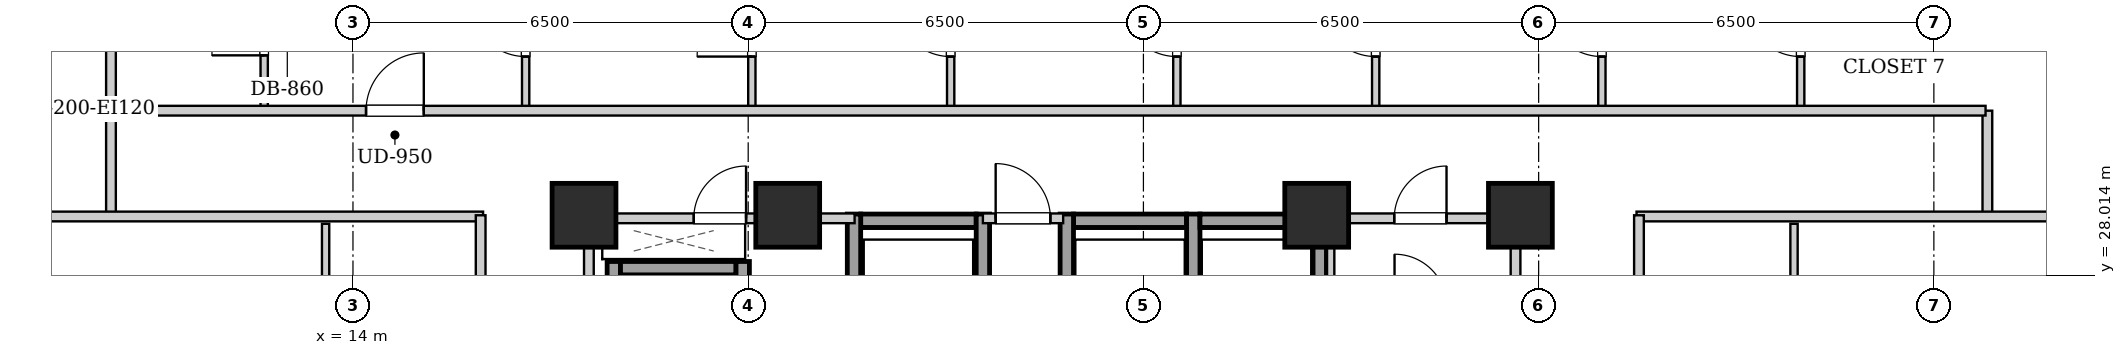
"""IFC4 building model, lengths in metres.
Left out: names, types, materials, properties, quantities, classifications, styles, units other than length and angle.
Written with IfcOpenShell. Run it as: python <this file> out.ifc"""

import sys

from ifc_helpers import new_model, si_unit, direction, frame, frame_2d, origin, origin_2d, place, context, subcontext, project, spatial, rectangle, extrude, element, fill, save


model = new_model("IFC4")
c1 = context("Model", 3, precision=1e-05, world=origin(), true_north=direction((0.0, 1.0)))
c2 = subcontext(c1, "Body", "Model", "MODEL_VIEW")
j1 = project(units=[si_unit("LENGTHUNIT", "METRE"), si_unit("PLANEANGLEUNIT", "RADIAN")], contexts=[c1])
p1 = place(None, origin())
s1 = spatial("IfcSite", under=j1, at=p1, CompositionType="ELEMENT")
p2 = place(p1, origin())
s2 = spatial("IfcBuilding", under=s1, at=p2, CompositionType="ELEMENT")
p3 = place(p2, frame((0.0, 0.0, 78.3)))
s3 = spatial("IfcBuildingStorey", under=s2, at=p3, CompositionType="ELEMENT", Elevation=78.3)
for number, where, z_axis, x_axis in (
    (1, (17.8, 29.0, 0.0), (0.0, 0.0, 1.0), (1.0, 0.0, 0.0)),
    (2, (21.15, 29.0, 0.0), (0.0, 0.0, 1.0), (1.0, 0.0, 0.0)),
    (3, (29.85, 29.0, 0.0), (0.0, 0.0, 1.0), (1.0, 0.0, 0.0)),
    (4, (33.2, 29.0, 0.0), (0.0, 0.0, 1.0), (1.0, 0.0, 0.0)),
):
    element("IfcColumn", number, at=place(p3, frame(where, z_axis=z_axis, x_axis=x_axis)), inside=s3, PredefinedType="COLUMN", context=c2, shape_type="SweptSolid", body=[
        extrude(rectangle(XDim=1.05, YDim=1.05, at=origin_2d()), origin(), (0.0, 0.0, 1.0), 3.2),
    ])
p4 = place(p3, frame((22.35, 28.91, 0.0), z_axis=(0.0, 0.0, 1.0), x_axis=(1.0, 0.0, 0.0)))
e5 = element("IfcWall", 5, at=p4, inside=s3, PredefinedType="SHEAR", context=c2, shape_type="SweptSolid", body=[
    extrude(rectangle(XDim=1.9, YDim=0.22, at=frame_2d((0.95, 0.0))), origin(), (0.0, 0.0, 1.0), 2.94),
])
for number, where, z_axis, x_axis in (
    (6, (22.24, 26.58, 0.0), (0.0, 0.0, 1.0), (0.0, 1.0, 0.0)),
    (7, (24.36, 26.58, 0.0), (0.0, 0.0, 1.0), (0.0, 1.0, 0.0)),
):
    element("IfcWall", number, at=place(p3, frame(where, z_axis=z_axis, x_axis=x_axis)), inside=s3, PredefinedType="SHEAR", context=c2, shape_type="SweptSolid", body=[
        extrude(rectangle(XDim=2.44, YDim=0.22, at=frame_2d((1.22, 0.0))), origin(), (0.0, 0.0, 1.0), 2.94),
    ])
p5 = place(p3, frame((25.85, 28.91, 0.0), z_axis=(0.0, 0.0, 1.0), x_axis=(1.0, 0.0, 0.0)))
e8 = element("IfcWall", 8, at=p5, inside=s3, PredefinedType="SHEAR", context=c2, shape_type="SweptSolid", body=[
    extrude(rectangle(XDim=1.86, YDim=0.22, at=frame_2d((0.93, 0.0))), origin(), (0.0, 0.0, 1.0), 2.94),
])
for number, where, z_axis, x_axis in (
    (9, (25.74, 26.58, 0.0), (0.0, 0.0, 1.0), (0.0, 1.0, 0.0)),
    (10, (27.82, 26.58, 0.0), (0.0, 0.0, 1.0), (0.0, 1.0, 0.0)),
):
    element("IfcWall", number, at=place(p3, frame(where, z_axis=z_axis, x_axis=x_axis)), inside=s3, PredefinedType="SHEAR", context=c2, shape_type="SweptSolid", body=[
        extrude(rectangle(XDim=2.44, YDim=0.22, at=frame_2d((1.22, 0.0))), origin(), (0.0, 0.0, 1.0), 2.94),
    ])
p6 = place(p3, frame((27.93, 28.91, 0.0), z_axis=(0.0, 0.0, 1.0), x_axis=(1.0, 0.0, 0.0)))
e11 = element("IfcWall", 11, at=p6, inside=s3, PredefinedType="SHEAR", context=c2, shape_type="SweptSolid", body=[
    extrude(rectangle(XDim=1.86, YDim=0.22, at=frame_2d((0.93, 0.0))), origin(), (0.0, 0.0, 1.0), 2.94),
])
p7 = place(p3, frame((29.9, 26.58, 0.0), z_axis=(0.0, 0.0, 1.0), x_axis=(0.0, 1.0, 0.0)))
e12 = element("IfcWall", 12, at=p7, inside=s3, PredefinedType="SHEAR", context=c2, shape_type="SweptSolid", body=[
    extrude(rectangle(XDim=2.44, YDim=0.22, at=frame_2d((1.22, 0.0))), origin(), (0.0, 0.0, 1.0), 2.94),
])
p8 = place(p3, frame((18.29, 24.1, 0.0), z_axis=(0.0, 0.0, 1.0), x_axis=(0.0, 1.0, 0.0)))
e13 = element("IfcWall", 13, at=p8, inside=s3, PredefinedType="SHEAR", context=c2, shape_type="SweptSolid", body=[
    extrude(rectangle(XDim=4.14, YDim=0.22, at=frame_2d((2.07, 0.0))), origin(), (0.0, 0.0, 1.0), 2.94),
])
p9 = place(p3, frame((18.4, 28.13, 0.0), z_axis=(0.0, 0.0, 1.0), x_axis=(1.0, 0.0, 0.0)))
e14 = element("IfcWall", 14, at=p9, inside=s3, PredefinedType="SHEAR", context=c2, shape_type="SweptSolid", body=[
    extrude(rectangle(XDim=1.9, YDim=0.22, at=frame_2d((0.95, 0.0))), origin(), (0.0, 0.0, 1.0), 2.94),
])
p10 = place(p3, frame((20.41, 26.06, 0.0), z_axis=(0.0, 0.0, 1.0), x_axis=(0.0, 1.0, 0.0)))
e15 = element("IfcWall", 15, at=p10, inside=s3, PredefinedType="SHEAR", context=c2, shape_type="SweptSolid", body=[
    extrude(rectangle(XDim=2.18, YDim=0.22, at=frame_2d((1.09, 0.0))), origin(), (0.0, 0.0, 1.0), 2.94),
])
for number, where, z_axis, x_axis in (
    (16, (17.88, 24.12, 0.0), (0.0, 0.0, 1.0), (0.0, 1.0, 0.0)),
    (17, (33.12, 24.12, 0.0), (0.0, 0.0, 1.0), (0.0, 1.0, 0.0)),
):
    element("IfcWall", number, at=place(p3, frame(where, z_axis=z_axis, x_axis=x_axis)), inside=s3, PredefinedType="PARTITIONING", context=c2, shape_type="SweptSolid", body=[
        extrude(rectangle(XDim=4.76, YDim=0.16, at=frame_2d((2.38, 0.0))), origin(), (0.0, 0.0, 1.0), 2.275),
    ])
p11 = place(p3, frame((24.36, 28.95, 0.0), z_axis=(0.0, 0.0, 1.0), x_axis=(1.0, 0.0, 0.0)))
e18 = element("IfcWall", 18, at=p11, inside=s3, PredefinedType="PARTITIONING", context=c2, shape_type="SweptSolid", body=[
    extrude(rectangle(XDim=1.32, YDim=0.16, at=frame_2d((0.66, 0.0))), origin(), (0.0, 0.0, 1.0), 2.309),
])
p12 = place(p11, frame((0.21, 0.0, 0.0)))
e19 = element("IfcOpeningElement", 19, at=p12, cuts=e18, PredefinedType="OPENING", context=c2, shape_type="SweptSolid", body=[
    extrude(rectangle(XDim=0.9, YDim=2.05, at=frame_2d((0.45, 1.025))), frame((0.0, 0.09, 0.0), z_axis=(0.0, -1.0, 0.0), x_axis=(1.0, 0.0, 0.0)), (0.0, 0.0, 1.0), 0.18),
])
p13 = place(p3, frame((17.96, 28.95, 0.0), z_axis=(0.0, 0.0, 1.0), x_axis=(1.0, 0.0, 0.0)))
e20 = element("IfcWall", 20, at=p13, inside=s3, PredefinedType="PARTITIONING", context=c2, shape_type="SweptSolid", body=[
    extrude(rectangle(XDim=4.29, YDim=0.16, at=frame_2d((2.145, 0.0))), origin(), (0.0, 0.0, 1.0), 2.309),
])
p14 = place(p13, frame((1.645, 0.0, 0.0)))
e21 = element("IfcOpeningElement", 21, at=p14, cuts=e20, PredefinedType="OPENING", context=c2, shape_type="SweptSolid", body=[
    extrude(rectangle(XDim=0.86, YDim=2.05, at=frame_2d((0.43, 1.025))), frame((0.0, 0.09, 0.0), z_axis=(0.0, -1.0, 0.0), x_axis=(1.0, 0.0, 0.0)), (0.0, 0.0, 1.0), 0.18),
])
p15 = place(p3, frame((30.08, 26.18, 0.0), z_axis=(0.0, 0.0, 1.0), x_axis=(0.0, 1.0, 0.0)))
e22 = element("IfcWall", 22, at=p15, inside=s3, PredefinedType="PARTITIONING", context=c2, shape_type="SweptSolid", body=[
    extrude(rectangle(XDim=2.68, YDim=0.12, at=frame_2d((1.34, 0.0))), origin(), (0.0, 0.0, 1.0), 2.94),
])
p16 = place(p3, frame((30.08, 28.95, 0.0), z_axis=(0.0, 0.0, 1.0), x_axis=(1.0, 0.0, 0.0)))
e23 = element("IfcWall", 23, at=p16, inside=s3, PredefinedType="PARTITIONING", context=c2, shape_type="SweptSolid", body=[
    extrude(rectangle(XDim=2.96, YDim=0.16, at=frame_2d((1.48, 0.0))), origin(), (0.0, 0.0, 1.0), 2.94),
])
p17 = place(p16, frame((1.045, 0.0, 0.0)))
e24 = element("IfcOpeningElement", 24, at=p17, cuts=e23, PredefinedType="OPENING", context=c2, shape_type="SweptSolid", body=[
    extrude(rectangle(XDim=0.86, YDim=2.05, at=frame_2d((0.43, 1.025))), frame((0.0, 0.09, 0.0), z_axis=(0.0, -1.0, 0.0), x_axis=(1.0, 0.0, 0.0)), (0.0, 0.0, 1.0), 0.18),
])
for number, where, z_axis, x_axis in (
    (25, (10.02, 28.98, 0.0), (0.0, 0.0, 1.0), (0.0, 1.0, 0.0)),
    (26, (40.88, 28.98, 0.0), (0.0, 0.0, 1.0), (0.0, 1.0, 0.0)),
):
    element("IfcWall", number, at=place(p3, frame(where, z_axis=z_axis, x_axis=x_axis)), inside=s3, PredefinedType="PARTITIONING", context=c2, shape_type="SweptSolid", body=[
        extrude(rectangle(XDim=1.74, YDim=0.16, at=frame_2d((0.87, 0.0))), origin(), (0.0, 0.0, 1.0), 2.94),
    ])
p18 = place(p3, frame((7.78, 28.98, 0.0), z_axis=(0.0, 0.0, 1.0), x_axis=(1.0, 0.0, 0.0)))
e27 = element("IfcWall", 27, at=p18, inside=s3, PredefinedType="PARTITIONING", context=c2, shape_type="SweptSolid", body=[
    extrude(rectangle(XDim=8.36, YDim=0.16, at=frame_2d((4.18, 0.0))), origin(), (0.0, 0.0, 1.0), 2.309),
])
p19 = place(p3, frame((35.11, 28.98, 0.0), z_axis=(0.0, 0.0, 1.0), x_axis=(1.0, 0.0, 0.0)))
e28 = element("IfcWall", 28, at=p19, inside=s3, PredefinedType="PARTITIONING", context=c2, shape_type="SweptSolid", body=[
    extrude(rectangle(XDim=8.01, YDim=0.16, at=frame_2d((4.005, 0.0))), origin(), (0.0, 0.0, 1.0), 2.309),
])
p20 = place(p3, frame((10.02, 30.76, 0.0), z_axis=(0.0, 0.0, 1.0), x_axis=(0.0, 1.0, 0.0)))
e29 = element("IfcWall", 29, at=p20, inside=s3, PredefinedType="PARTITIONING", context=c2, shape_type="SweptSolid", body=[
    extrude(rectangle(XDim=2.66, YDim=0.16, at=frame_2d((1.33, 0.0))), origin(), (0.0, 0.0, 1.0), 2.94),
])
p21 = place(p3, frame((12.54, 30.76, 0.0), z_axis=(0.0, 0.0, 1.0), x_axis=(0.0, 1.0, 0.0)))
e30 = element("IfcWall", 30, at=p21, inside=s3, PredefinedType="PARTITIONING", context=c2, shape_type="SweptSolid", body=[
    extrude(rectangle(XDim=2.6, YDim=0.12, at=frame_2d((1.3, 0.0))), origin(), (0.0, 0.0, 1.0), 2.94),
])
p22 = place(p21, frame((0.87, 0.0, 0.0)))
e31 = element("IfcOpeningElement", 31, at=p22, cuts=e30, PredefinedType="OPENING", context=c2, shape_type="SweptSolid", body=[
    extrude(rectangle(XDim=0.86, YDim=2.05, at=frame_2d((0.43, 1.025))), frame((0.0, 0.07, 0.0), z_axis=(0.0, -1.0, 0.0), x_axis=(1.0, 0.0, 0.0)), (0.0, 0.0, 1.0), 0.14),
])
p23 = place(p3, frame((16.84, 30.76, 0.0), z_axis=(0.0, 0.0, 1.0), x_axis=(0.0, 1.0, 0.0)))
e32 = element("IfcWall", 32, at=p23, inside=s3, PredefinedType="PARTITIONING", context=c2, shape_type="SweptSolid", body=[
    extrude(rectangle(XDim=2.6, YDim=0.12, at=frame_2d((1.3, 0.0))), origin(), (0.0, 0.0, 1.0), 2.94),
])
p24 = place(p23, frame((0.85, 0.0, 0.0)))
e33 = element("IfcOpeningElement", 33, at=p24, cuts=e32, PredefinedType="OPENING", context=c2, shape_type="SweptSolid", body=[
    extrude(rectangle(XDim=0.9, YDim=2.05, at=frame_2d((0.45, 1.025))), frame((0.0, 0.07, 0.0), z_axis=(0.0, -1.0, 0.0), x_axis=(1.0, 0.0, 0.0)), (0.0, 0.0, 1.0), 0.14),
])
p25 = place(p3, frame((20.56, 30.76, 0.0), z_axis=(0.0, 0.0, 1.0), x_axis=(0.0, 1.0, 0.0)))
e34 = element("IfcWall", 34, at=p25, inside=s3, PredefinedType="PARTITIONING", context=c2, shape_type="SweptSolid", body=[
    extrude(rectangle(XDim=2.6, YDim=0.12, at=frame_2d((1.3, 0.0))), origin(), (0.0, 0.0, 1.0), 2.94),
])
p26 = place(p25, frame((0.85, 0.0, 0.0)))
e35 = element("IfcOpeningElement", 35, at=p26, cuts=e34, PredefinedType="OPENING", context=c2, shape_type="SweptSolid", body=[
    extrude(rectangle(XDim=0.9, YDim=2.05, at=frame_2d((0.45, 1.025))), frame((0.0, 0.07, 0.0), z_axis=(0.0, -1.0, 0.0), x_axis=(1.0, 0.0, 0.0)), (0.0, 0.0, 1.0), 0.14),
])
p27 = place(p3, frame((23.83, 30.76, 0.0), z_axis=(0.0, 0.0, 1.0), x_axis=(0.0, 1.0, 0.0)))
e36 = element("IfcWall", 36, at=p27, inside=s3, PredefinedType="PARTITIONING", context=c2, shape_type="SweptSolid", body=[
    extrude(rectangle(XDim=2.6, YDim=0.12, at=frame_2d((1.3, 0.0))), origin(), (0.0, 0.0, 1.0), 2.94),
])
p28 = place(p27, frame((0.85, 0.0, 0.0)))
e37 = element("IfcOpeningElement", 37, at=p28, cuts=e36, PredefinedType="OPENING", context=c2, shape_type="SweptSolid", body=[
    extrude(rectangle(XDim=0.9, YDim=2.05, at=frame_2d((0.45, 1.025))), frame((0.0, 0.07, 0.0), z_axis=(0.0, -1.0, 0.0), x_axis=(1.0, 0.0, 0.0)), (0.0, 0.0, 1.0), 0.14),
])
p29 = place(p3, frame((27.55, 30.76, 0.0), z_axis=(0.0, 0.0, 1.0), x_axis=(0.0, 1.0, 0.0)))
e38 = element("IfcWall", 38, at=p29, inside=s3, PredefinedType="PARTITIONING", context=c2, shape_type="SweptSolid", body=[
    extrude(rectangle(XDim=2.6, YDim=0.12, at=frame_2d((1.3, 0.0))), origin(), (0.0, 0.0, 1.0), 2.94),
])
p30 = place(p29, frame((0.85, 0.0, 0.0)))
e39 = element("IfcOpeningElement", 39, at=p30, cuts=e38, PredefinedType="OPENING", context=c2, shape_type="SweptSolid", body=[
    extrude(rectangle(XDim=0.9, YDim=2.05, at=frame_2d((0.45, 1.025))), frame((0.0, 0.07, 0.0), z_axis=(0.0, -1.0, 0.0), x_axis=(1.0, 0.0, 0.0)), (0.0, 0.0, 1.0), 0.14),
])
p31 = place(p3, frame((30.82, 30.76, 0.0), z_axis=(0.0, 0.0, 1.0), x_axis=(0.0, 1.0, 0.0)))
e40 = element("IfcWall", 40, at=p31, inside=s3, PredefinedType="PARTITIONING", context=c2, shape_type="SweptSolid", body=[
    extrude(rectangle(XDim=2.6, YDim=0.12, at=frame_2d((1.3, 0.0))), origin(), (0.0, 0.0, 1.0), 2.94),
])
p32 = place(p31, frame((0.85, 0.0, 0.0)))
e41 = element("IfcOpeningElement", 41, at=p32, cuts=e40, PredefinedType="OPENING", context=c2, shape_type="SweptSolid", body=[
    extrude(rectangle(XDim=0.9, YDim=2.05, at=frame_2d((0.45, 1.025))), frame((0.0, 0.07, 0.0), z_axis=(0.0, -1.0, 0.0), x_axis=(1.0, 0.0, 0.0)), (0.0, 0.0, 1.0), 0.14),
])
p33 = place(p3, frame((34.54, 30.76, 0.0), z_axis=(0.0, 0.0, 1.0), x_axis=(0.0, 1.0, 0.0)))
e42 = element("IfcWall", 42, at=p33, inside=s3, PredefinedType="PARTITIONING", context=c2, shape_type="SweptSolid", body=[
    extrude(rectangle(XDim=2.6, YDim=0.12, at=frame_2d((1.3, 0.0))), origin(), (0.0, 0.0, 1.0), 2.94),
])
p34 = place(p33, frame((0.85, 0.0, 0.0)))
e43 = element("IfcOpeningElement", 43, at=p34, cuts=e42, PredefinedType="OPENING", context=c2, shape_type="SweptSolid", body=[
    extrude(rectangle(XDim=0.9, YDim=2.05, at=frame_2d((0.45, 1.025))), frame((0.0, 0.07, 0.0), z_axis=(0.0, -1.0, 0.0), x_axis=(1.0, 0.0, 0.0)), (0.0, 0.0, 1.0), 0.14),
])
p35 = place(p3, frame((37.81, 30.76, 0.0), z_axis=(0.0, 0.0, 1.0), x_axis=(0.0, 1.0, 0.0)))
e44 = element("IfcWall", 44, at=p35, inside=s3, PredefinedType="PARTITIONING", context=c2, shape_type="SweptSolid", body=[
    extrude(rectangle(XDim=2.6, YDim=0.12, at=frame_2d((1.3, 0.0))), origin(), (0.0, 0.0, 1.0), 2.94),
])
p36 = place(p35, frame((0.85, 0.0, 0.0)))
e45 = element("IfcOpeningElement", 45, at=p36, cuts=e44, PredefinedType="OPENING", context=c2, shape_type="SweptSolid", body=[
    extrude(rectangle(XDim=0.9, YDim=2.05, at=frame_2d((0.45, 1.025))), frame((0.0, 0.07, 0.0), z_axis=(0.0, -1.0, 0.0), x_axis=(1.0, 0.0, 0.0)), (0.0, 0.0, 1.0), 0.14),
])
p37 = place(p3, frame((13.55, 24.552, 0.0), z_axis=(0.0, 0.0, 1.0), x_axis=(0.0, 1.0, 0.0)))
e46 = element("IfcWall", 46, at=p37, inside=s3, PredefinedType="PARTITIONING", context=c2, shape_type="SweptSolid", body=[
    extrude(rectangle(XDim=4.308, YDim=0.12, at=frame_2d((2.154, 0.0))), origin(), (0.0, 0.0, 1.0), 2.94),
])
p38 = place(p37, frame((1.704, 0.0, 0.0)))
e47 = element("IfcOpeningElement", 47, at=p38, cuts=e46, PredefinedType="OPENING", context=c2, shape_type="SweptSolid", body=[
    extrude(rectangle(XDim=0.9, YDim=2.05, at=frame_2d((0.45, 1.025))), frame((0.0, 0.07, 0.0), z_axis=(0.0, -1.0, 0.0), x_axis=(1.0, 0.0, 0.0)), (0.0, 0.0, 1.0), 0.14),
])
p39 = place(p3, frame((37.7, 23.527, 0.0), z_axis=(0.0, 0.0, 1.0), x_axis=(0.0, 1.0, 0.0)))
e48 = element("IfcWall", 48, at=p39, inside=s3, PredefinedType="PARTITIONING", context=c2, shape_type="SweptSolid", body=[
    extrude(rectangle(XDim=5.333, YDim=0.12, at=frame_2d((2.667, 0.0))), origin(), (0.0, 0.0, 1.0), 2.94),
])
p40 = place(p39, frame((2.216, 0.0, 0.0)))
e49 = element("IfcOpeningElement", 49, at=p40, cuts=e48, PredefinedType="OPENING", context=c2, shape_type="SweptSolid", body=[
    extrude(rectangle(XDim=0.9, YDim=2.05, at=frame_2d((0.45, 1.025))), frame((0.0, 0.07, 0.0), z_axis=(0.0, -1.0, 0.0), x_axis=(1.0, 0.0, 0.0)), (0.0, 0.0, 1.0), 0.14),
])
p41 = place(p3, frame((10.05, 30.72, 0.0), z_axis=(0.0, 0.0, 1.0), x_axis=(1.0, 0.0, 0.0)))
e50 = element("IfcWall", 50, at=p41, inside=s3, PredefinedType="PARTITIONING", context=c2, shape_type="SweptSolid", body=[
    extrude(rectangle(XDim=30.8, YDim=0.16, at=frame_2d((15.4, 0.0))), origin(), (0.0, 0.0, 1.0), 2.94),
])
p42 = place(p41, frame((4.165, 0.0, 0.0)))
e51 = element("IfcOpeningElement", 51, at=p42, cuts=e50, PredefinedType="OPENING", context=c2, shape_type="SweptSolid", body=[
    extrude(rectangle(XDim=0.95, YDim=2.1, at=frame_2d((0.475, 1.05))), frame((0.0, 0.09, 0.0), z_axis=(0.0, -1.0, 0.0), x_axis=(1.0, 0.0, 0.0)), (0.0, 0.0, 1.0), 0.18),
])
p43 = place(p3, frame((16.1, 15.07, 0.0), z_axis=(0.0, 0.0, 1.0), x_axis=(0.0, 1.0, 0.0)))
e52 = element("IfcWall", 52, at=p43, inside=s3, PredefinedType="PARTITIONING", context=c2, shape_type="SweptSolid", body=[
    extrude(rectangle(XDim=13.93, YDim=0.16, at=frame_2d((6.965, 0.0))), origin(), (0.0, 0.0, 1.0), 2.94),
])
p44 = place(p43, frame((4.385, 0.0, 0.0)))
e53 = element("IfcOpeningElement", 53, at=p44, cuts=e52, PredefinedType="OPENING", context=c2, shape_type="SweptSolid", body=[
    extrude(rectangle(XDim=0.95, YDim=2.1, at=frame_2d((0.475, 1.05))), frame((0.0, 0.09, 0.0), z_axis=(0.0, -1.0, 0.0), x_axis=(1.0, 0.0, 0.0)), (0.0, 0.0, 1.0), 0.18),
])
p45 = place(p3, frame((35.15, 15.07, 0.0), z_axis=(0.0, 0.0, 1.0), x_axis=(0.0, 1.0, 0.0)))
e54 = element("IfcWall", 54, at=p45, inside=s3, PredefinedType="PARTITIONING", context=c2, shape_type="SweptSolid", body=[
    extrude(rectangle(XDim=13.93, YDim=0.16, at=frame_2d((6.965, 0.0))), origin(), (0.0, 0.0, 1.0), 2.94),
])
p46 = place(p45, frame((3.608, 0.0, 0.0)))
e55 = element("IfcOpeningElement", 55, at=p46, cuts=e54, PredefinedType="OPENING", context=c2, shape_type="SweptSolid", body=[
    extrude(rectangle(XDim=0.95, YDim=2.1, at=frame_2d((0.475, 1.05))), frame((0.0, 0.09, 0.0), z_axis=(0.0, -1.0, 0.0), x_axis=(1.0, 0.0, 0.0)), (0.0, 0.0, 1.0), 0.18),
])
p47 = place(p45, frame((10.649, 0.0, 0.0)))
e56 = element("IfcOpeningElement", 56, at=p47, cuts=e54, PredefinedType="OPENING", context=c2, shape_type="SweptSolid", body=[
    extrude(rectangle(XDim=0.95, YDim=2.1, at=frame_2d((0.475, 1.05))), frame((0.0, 0.09, 0.0), z_axis=(0.0, -1.0, 0.0), x_axis=(1.0, 0.0, 0.0)), (0.0, 0.0, 1.0), 0.18),
])
p48 = place(p12, origin())
e57 = element("IfcDoor", 57, at=p48, inside=s3, OperationType="SINGLE_SWING_LEFT", PredefinedType="DOOR", context=c2, shape_type="SweptSolid", body=[
    extrude(rectangle(XDim=0.9, YDim=2.05, at=frame_2d((0.45, 1.025))), frame((0.0, 0.025, 0.0), z_axis=(0.0, -1.0, 0.0), x_axis=(1.0, 0.0, 0.0)), (0.0, 0.0, 1.0), 0.05),
])
fill(e19, e57)
p49 = place(p14, origin())
e58 = element("IfcDoor", 58, at=p49, inside=s3, OperationType="SINGLE_SWING_RIGHT", PredefinedType="DOOR", context=c2, shape_type="SweptSolid", body=[
    extrude(rectangle(XDim=0.86, YDim=2.05, at=frame_2d((0.43, 1.025))), frame((0.0, 0.025, 0.0), z_axis=(0.0, -1.0, 0.0), x_axis=(1.0, 0.0, 0.0)), (0.0, 0.0, 1.0), 0.05),
])
fill(e21, e58)
p50 = place(p17, origin())
e59 = element("IfcDoor", 59, at=p50, inside=s3, OperationType="SINGLE_SWING_RIGHT", PredefinedType="DOOR", context=c2, shape_type="SweptSolid", body=[
    extrude(rectangle(XDim=0.86, YDim=2.05, at=frame_2d((0.43, 1.025))), frame((0.0, 0.025, 0.0), z_axis=(0.0, -1.0, 0.0), x_axis=(1.0, 0.0, 0.0)), (0.0, 0.0, 1.0), 0.05),
])
fill(e24, e59)
p51 = place(p22, origin())
e60 = element("IfcDoor", 60, at=p51, inside=s3, OperationType="SINGLE_SWING_LEFT", PredefinedType="DOOR", context=c2, shape_type="SweptSolid", body=[
    extrude(rectangle(XDim=0.86, YDim=2.05, at=frame_2d((0.43, 1.025))), frame((0.0, 0.025, 0.0), z_axis=(0.0, -1.0, 0.0), x_axis=(1.0, 0.0, 0.0)), (0.0, 0.0, 1.0), 0.05),
])
fill(e31, e60)
p52 = place(p24, origin())
e61 = element("IfcDoor", 61, at=p52, inside=s3, OperationType="SINGLE_SWING_RIGHT", PredefinedType="DOOR", context=c2, shape_type="SweptSolid", body=[
    extrude(rectangle(XDim=0.9, YDim=2.05, at=frame_2d((0.45, 1.025))), frame((0.0, 0.025, 0.0), z_axis=(0.0, -1.0, 0.0), x_axis=(1.0, 0.0, 0.0)), (0.0, 0.0, 1.0), 0.05),
])
fill(e33, e61)
p53 = place(p26, origin())
e62 = element("IfcDoor", 62, at=p53, inside=s3, OperationType="SINGLE_SWING_LEFT", PredefinedType="DOOR", context=c2, shape_type="SweptSolid", body=[
    extrude(rectangle(XDim=0.9, YDim=2.05, at=frame_2d((0.45, 1.025))), frame((0.0, 0.025, 0.0), z_axis=(0.0, -1.0, 0.0), x_axis=(1.0, 0.0, 0.0)), (0.0, 0.0, 1.0), 0.05),
])
fill(e35, e62)
p54 = place(p28, origin())
e63 = element("IfcDoor", 63, at=p54, inside=s3, OperationType="SINGLE_SWING_RIGHT", PredefinedType="DOOR", context=c2, shape_type="SweptSolid", body=[
    extrude(rectangle(XDim=0.9, YDim=2.05, at=frame_2d((0.45, 1.025))), frame((0.0, 0.025, 0.0), z_axis=(0.0, -1.0, 0.0), x_axis=(1.0, 0.0, 0.0)), (0.0, 0.0, 1.0), 0.05),
])
fill(e37, e63)
p55 = place(p30, origin())
e64 = element("IfcDoor", 64, at=p55, inside=s3, OperationType="SINGLE_SWING_RIGHT", PredefinedType="DOOR", context=c2, shape_type="SweptSolid", body=[
    extrude(rectangle(XDim=0.9, YDim=2.05, at=frame_2d((0.45, 1.025))), frame((0.0, 0.025, 0.0), z_axis=(0.0, -1.0, 0.0), x_axis=(1.0, 0.0, 0.0)), (0.0, 0.0, 1.0), 0.05),
])
fill(e39, e64)
p56 = place(p32, origin())
e65 = element("IfcDoor", 65, at=p56, inside=s3, OperationType="SINGLE_SWING_RIGHT", PredefinedType="DOOR", context=c2, shape_type="SweptSolid", body=[
    extrude(rectangle(XDim=0.9, YDim=2.05, at=frame_2d((0.45, 1.025))), frame((0.0, 0.025, 0.0), z_axis=(0.0, -1.0, 0.0), x_axis=(1.0, 0.0, 0.0)), (0.0, 0.0, 1.0), 0.05),
])
fill(e41, e65)
p57 = place(p34, origin())
e66 = element("IfcDoor", 66, at=p57, inside=s3, OperationType="SINGLE_SWING_RIGHT", PredefinedType="DOOR", context=c2, shape_type="SweptSolid", body=[
    extrude(rectangle(XDim=0.9, YDim=2.05, at=frame_2d((0.45, 1.025))), frame((0.0, 0.025, 0.0), z_axis=(0.0, -1.0, 0.0), x_axis=(1.0, 0.0, 0.0)), (0.0, 0.0, 1.0), 0.05),
])
fill(e43, e66)
p58 = place(p36, origin())
e67 = element("IfcDoor", 67, at=p58, inside=s3, OperationType="SINGLE_SWING_RIGHT", PredefinedType="DOOR", context=c2, shape_type="SweptSolid", body=[
    extrude(rectangle(XDim=0.9, YDim=2.05, at=frame_2d((0.45, 1.025))), frame((0.0, 0.025, 0.0), z_axis=(0.0, -1.0, 0.0), x_axis=(1.0, 0.0, 0.0)), (0.0, 0.0, 1.0), 0.05),
])
fill(e45, e67)
p59 = place(p42, origin())
e68 = element("IfcDoor", 68, at=p59, inside=s3, OperationType="SINGLE_SWING_RIGHT", PredefinedType="DOOR", context=c2, shape_type="SweptSolid", body=[
    extrude(rectangle(XDim=0.95, YDim=2.1, at=frame_2d((0.475, 1.05))), frame((0.0, 0.025, 0.0), z_axis=(0.0, -1.0, 0.0), x_axis=(1.0, 0.0, 0.0)), (0.0, 0.0, 1.0), 0.05),
])
fill(e51, e68)
save(model, sys.argv[1])
